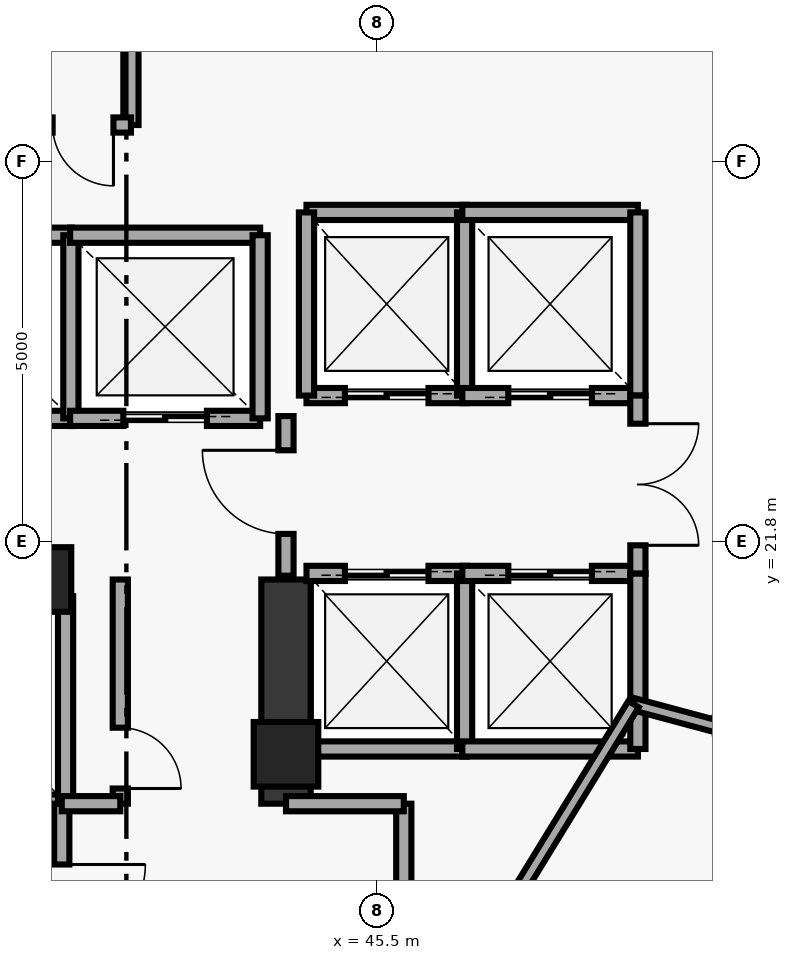
"""IFC4 building model, lengths in metres.
Left out: names, types, materials, properties, quantities, classifications, styles, units other than length and angle.
Written with IfcOpenShell. Run it as: python <this file> out.ifc"""

import sys

from ifc_helpers import new_model, si_unit, direction, frame, frame_2d, origin, origin_2d, place, context, subcontext, project, spatial, rectangle, extrude, element, fill, save


model = new_model("IFC4")
c1 = context("Model", 3, precision=1e-05, world=origin(), true_north=direction((0.0, 1.0)))
c2 = subcontext(c1, "Body", "Model", "MODEL_VIEW")
j1 = project(units=[si_unit("LENGTHUNIT", "METRE"), si_unit("PLANEANGLEUNIT", "RADIAN")], contexts=[c1])
p1 = place(None, origin())
s1 = spatial("IfcSite", under=j1, at=p1, CompositionType="ELEMENT")
p2 = place(p1, origin())
s2 = spatial("IfcBuilding", under=s1, at=p2, CompositionType="ELEMENT")
p3 = place(p2, frame((0.0, 0.0, 203.15)))
s3 = spatial("IfcBuildingStorey", under=s2, at=p3, CompositionType="ELEMENT", Elevation=203.15)
for number, where, z_axis, x_axis in (
    (1, (41.05, 21.3, 0.0), (0.0, 0.0, 1.0), (1.0, 0.0, 0.0)),
    (2, (44.3, 19.0, 0.0), (0.0, 0.0, 1.0), (1.0, 0.0, 0.0)),
):
    element("IfcColumn", number, at=place(p3, frame(where, z_axis=z_axis, x_axis=x_axis)), inside=s3, PredefinedType="PILASTER", context=c2, shape_type="SweptSolid", body=[
        extrude(rectangle(XDim=0.85, YDim=0.85, at=origin_2d()), origin(), (0.0, 0.0, 1.0), 4.76),
    ])
p4 = place(p3, frame((44.3, 18.35, 0.0), z_axis=(0.0, 0.0, 1.0), x_axis=(0.0, 1.0, 0.0)))
e3 = element("IfcWall", 3, at=p4, inside=s3, PredefinedType="SHEAR", context=c2, shape_type="SweptSolid", body=[
    extrude(rectangle(XDim=2.95, YDim=0.65, at=frame_2d((1.475, 0.0))), origin(), (0.0, 0.0, 1.0), 4.76),
])
p5 = place(p3, frame((33.7, 21.3, 0.0), z_axis=(0.0, 0.0, 1.0), x_axis=(1.0, 0.0, 0.0)))
e4 = element("IfcWall", 4, at=p5, inside=s3, PredefinedType="SHEAR", context=c2, shape_type="SweptSolid", body=[
    extrude(rectangle(XDim=7.55, YDim=0.65, at=frame_2d((3.775, 0.0))), origin(), (0.0, 0.0, 1.0), 4.76),
])
p6 = place(p3, frame((42.26, 27.28, 0.0), z_axis=(0.0, 0.0, 1.0), x_axis=(0.0, 1.0, 0.0)))
e5 = element("IfcWall", 5, at=p6, inside=s3, PredefinedType="SOLIDWALL", context=c2, shape_type="SweptSolid", body=[
    extrude(rectangle(XDim=1.77, YDim=0.2, at=frame_2d((0.885, 0.0))), origin(), (0.0, 0.0, 1.0), 4.76),
])
p7 = place(p3, frame((41.0, 27.28, 0.0), z_axis=(0.0, 0.0, 1.0), x_axis=(1.0, 0.0, 0.0)))
e6 = element("IfcWall", 6, at=p7, inside=s3, PredefinedType="SOLIDWALL", context=c2, shape_type="SweptSolid", body=[
    extrude(rectangle(XDim=1.26, YDim=0.2, at=frame_2d((0.63, 0.0))), origin(), (0.0, 0.0, 1.0), 4.76),
])
p8 = place(p7, frame((0.23, 0.0, 0.0)))
e7 = element("IfcOpeningElement", 7, at=p8, cuts=e6, PredefinedType="OPENING", context=c2, shape_type="SweptSolid", body=[
    extrude(rectangle(XDim=0.8, YDim=2.05, at=frame_2d((0.4, 1.025))), frame((0.0, 0.11, 0.0), z_axis=(0.0, -1.0, 0.0), x_axis=(1.0, 0.0, 0.0)), (0.0, 0.0, 1.0), 0.22),
])
p9 = place(p3, frame((44.57, 23.72, 0.0), z_axis=(0.0, 0.0, 1.0), x_axis=(1.0, 0.0, 0.0)))
e8 = element("IfcWall", 8, at=p9, inside=s3, PredefinedType="SOLIDWALL", context=c2, shape_type="SweptSolid", body=[
    extrude(rectangle(XDim=2.11, YDim=0.2, at=frame_2d((1.055, 0.0))), origin(), (0.0, 0.0, 1.0), 4.76),
])
p10 = place(p9, frame((0.505, 0.0, 0.0)))
e9 = element("IfcOpeningElement", 9, at=p10, cuts=e8, PredefinedType="OPENING", context=c2, shape_type="SweptSolid", body=[
    extrude(rectangle(XDim=1.1, YDim=2.15, at=frame_2d((0.55, 1.075))), frame((0.0, 0.11, 0.0), z_axis=(0.0, -1.0, 0.0), x_axis=(1.0, 0.0, 0.0)), (0.0, 0.0, 1.0), 0.22),
])
p11 = place(p3, frame((44.57, 26.13, 0.0), z_axis=(0.0, 0.0, 1.0), x_axis=(1.0, 0.0, 0.0)))
e10 = element("IfcWall", 10, at=p11, inside=s3, PredefinedType="SOLIDWALL", context=c2, shape_type="SweptSolid", body=[
    extrude(rectangle(XDim=2.11, YDim=0.2, at=frame_2d((1.055, 0.0))), origin(), (0.0, 0.0, 1.0), 4.76),
])
for number, where, z_axis, x_axis in (
    (11, (44.57, 23.72, 0.0), (0.0, 0.0, 1.0), (0.0, 1.0, 0.0)),
    (12, (46.65, 23.72, 0.0), (0.0, 0.0, 1.0), (0.0, 1.0, 0.0)),
):
    element("IfcWall", number, at=place(p3, frame(where, z_axis=z_axis, x_axis=x_axis)), inside=s3, PredefinedType="SOLIDWALL", context=c2, shape_type="SweptSolid", body=[
        extrude(rectangle(XDim=2.41, YDim=0.2, at=frame_2d((1.205, 0.0))), origin(), (0.0, 0.0, 1.0), 4.76),
    ])
p12 = place(p3, frame((46.62, 23.72, 0.0), z_axis=(0.0, 0.0, 1.0), x_axis=(1.0, 0.0, 0.0)))
e13 = element("IfcWall", 13, at=p12, inside=s3, PredefinedType="SOLIDWALL", context=c2, shape_type="SweptSolid", body=[
    extrude(rectangle(XDim=2.31, YDim=0.2, at=frame_2d((1.155, 0.0))), origin(), (0.0, 0.0, 1.0), 4.76),
])
p13 = place(p12, frame((0.605, 0.0, 0.0)))
e14 = element("IfcOpeningElement", 14, at=p13, cuts=e13, PredefinedType="OPENING", context=c2, shape_type="SweptSolid", body=[
    extrude(rectangle(XDim=1.1, YDim=2.15, at=frame_2d((0.55, 1.075))), frame((0.0, 0.11, 0.0), z_axis=(0.0, -1.0, 0.0), x_axis=(1.0, 0.0, 0.0)), (0.0, 0.0, 1.0), 0.22),
])
p14 = place(p3, frame((46.62, 26.13, 0.0), z_axis=(0.0, 0.0, 1.0), x_axis=(1.0, 0.0, 0.0)))
e15 = element("IfcWall", 15, at=p14, inside=s3, PredefinedType="SOLIDWALL", context=c2, shape_type="SweptSolid", body=[
    extrude(rectangle(XDim=2.31, YDim=0.2, at=frame_2d((1.155, 0.0))), origin(), (0.0, 0.0, 1.0), 4.76),
])
p15 = place(p3, frame((48.93, 23.72, 0.0), z_axis=(0.0, 0.0, 1.0), x_axis=(0.0, 1.0, 0.0)))
e16 = element("IfcWall", 16, at=p15, inside=s3, PredefinedType="SOLIDWALL", context=c2, shape_type="SweptSolid", body=[
    extrude(rectangle(XDim=2.41, YDim=0.2, at=frame_2d((1.205, 0.0))), origin(), (0.0, 0.0, 1.0), 4.76),
])
p16 = place(p3, frame((44.57, 19.07, 0.0), z_axis=(0.0, 0.0, 1.0), x_axis=(1.0, 0.0, 0.0)))
e17 = element("IfcWall", 17, at=p16, inside=s3, PredefinedType="SOLIDWALL", context=c2, shape_type="SweptSolid", body=[
    extrude(rectangle(XDim=2.11, YDim=0.2, at=frame_2d((1.055, 0.0))), origin(), (0.0, 0.0, 1.0), 4.76),
])
p17 = place(p3, frame((44.57, 21.38, 0.0), z_axis=(0.0, 0.0, 1.0), x_axis=(1.0, 0.0, 0.0)))
e18 = element("IfcWall", 18, at=p17, inside=s3, PredefinedType="SOLIDWALL", context=c2, shape_type="SweptSolid", body=[
    extrude(rectangle(XDim=2.11, YDim=0.2, at=frame_2d((1.055, 0.0))), origin(), (0.0, 0.0, 1.0), 4.76),
])
p18 = place(p17, frame((0.505, 0.0, 0.0)))
e19 = element("IfcOpeningElement", 19, at=p18, cuts=e18, PredefinedType="OPENING", context=c2, shape_type="SweptSolid", body=[
    extrude(rectangle(XDim=1.1, YDim=2.15, at=frame_2d((0.55, 1.075))), frame((0.0, 0.11, 0.0), z_axis=(0.0, -1.0, 0.0), x_axis=(1.0, 0.0, 0.0)), (0.0, 0.0, 1.0), 0.22),
])
for number, where, z_axis, x_axis in (
    (20, (46.65, 19.07, 0.0), (0.0, 0.0, 1.0), (0.0, 1.0, 0.0)),
    (21, (46.62, 19.07, 0.0), (0.0, 0.0, 1.0), (1.0, 0.0, 0.0)),
):
    element("IfcWall", number, at=place(p3, frame(where, z_axis=z_axis, x_axis=x_axis)), inside=s3, PredefinedType="SOLIDWALL", context=c2, shape_type="SweptSolid", body=[
        extrude(rectangle(XDim=2.31, YDim=0.2, at=frame_2d((1.155, 0.0))), origin(), (0.0, 0.0, 1.0), 4.76),
    ])
p19 = place(p3, frame((46.62, 21.38, 0.0), z_axis=(0.0, 0.0, 1.0), x_axis=(1.0, 0.0, 0.0)))
e22 = element("IfcWall", 22, at=p19, inside=s3, PredefinedType="SOLIDWALL", context=c2, shape_type="SweptSolid", body=[
    extrude(rectangle(XDim=2.31, YDim=0.2, at=frame_2d((1.155, 0.0))), origin(), (0.0, 0.0, 1.0), 4.76),
])
p20 = place(p19, frame((0.605, 0.0, 0.0)))
e23 = element("IfcOpeningElement", 23, at=p20, cuts=e22, PredefinedType="OPENING", context=c2, shape_type="SweptSolid", body=[
    extrude(rectangle(XDim=1.1, YDim=2.15, at=frame_2d((0.55, 1.075))), frame((0.0, 0.11, 0.0), z_axis=(0.0, -1.0, 0.0), x_axis=(1.0, 0.0, 0.0)), (0.0, 0.0, 1.0), 0.22),
])
p21 = place(p3, frame((48.93, 19.07, 0.0), z_axis=(0.0, 0.0, 1.0), x_axis=(0.0, 1.0, 0.0)))
e24 = element("IfcWall", 24, at=p21, inside=s3, PredefinedType="SOLIDWALL", context=c2, shape_type="SweptSolid", body=[
    extrude(rectangle(XDim=2.31, YDim=0.2, at=frame_2d((1.155, 0.0))), origin(), (0.0, 0.0, 1.0), 4.76),
])
p22 = place(p3, frame((38.98, 23.42, 0.0), z_axis=(0.0, 0.0, 1.0), x_axis=(1.0, 0.0, 0.0)))
e25 = element("IfcWall", 25, at=p22, inside=s3, PredefinedType="SOLIDWALL", context=c2, shape_type="SweptSolid", body=[
    extrude(rectangle(XDim=2.5, YDim=0.2, at=frame_2d((1.25, 0.0))), origin(), (0.0, 0.0, 1.0), 4.76),
])
p23 = place(p22, frame((0.7, 0.0, 0.0)))
e26 = element("IfcOpeningElement", 26, at=p23, cuts=e25, PredefinedType="OPENING", context=c2, shape_type="SweptSolid", body=[
    extrude(rectangle(XDim=1.1, YDim=2.15, at=frame_2d((0.55, 1.075))), frame((0.0, 0.11, 0.0), z_axis=(0.0, -1.0, 0.0), x_axis=(1.0, 0.0, 0.0)), (0.0, 0.0, 1.0), 0.22),
])
p24 = place(p3, frame((38.98, 25.83, 0.0), z_axis=(0.0, 0.0, 1.0), x_axis=(1.0, 0.0, 0.0)))
e27 = element("IfcWall", 27, at=p24, inside=s3, PredefinedType="SOLIDWALL", context=c2, shape_type="SweptSolid", body=[
    extrude(rectangle(XDim=2.5, YDim=0.2, at=frame_2d((1.25, 0.0))), origin(), (0.0, 0.0, 1.0), 4.76),
])
p25 = place(p3, frame((41.47, 23.42, 0.0), z_axis=(0.0, 0.0, 1.0), x_axis=(0.0, 1.0, 0.0)))
e28 = element("IfcWall", 28, at=p25, inside=s3, PredefinedType="SOLIDWALL", context=c2, shape_type="SweptSolid", body=[
    extrude(rectangle(XDim=2.41, YDim=0.2, at=frame_2d((1.205, 0.0))), origin(), (0.0, 0.0, 1.0), 4.76),
])
p26 = place(p3, frame((41.46, 23.42, 0.0), z_axis=(0.0, 0.0, 1.0), x_axis=(1.0, 0.0, 0.0)))
e29 = element("IfcWall", 29, at=p26, inside=s3, PredefinedType="SOLIDWALL", context=c2, shape_type="SweptSolid", body=[
    extrude(rectangle(XDim=2.5, YDim=0.2, at=frame_2d((1.25, 0.0))), origin(), (0.0, 0.0, 1.0), 4.76),
])
p27 = place(p26, frame((0.7, 0.0, 0.0)))
e30 = element("IfcOpeningElement", 30, at=p27, cuts=e29, PredefinedType="OPENING", context=c2, shape_type="SweptSolid", body=[
    extrude(rectangle(XDim=1.1, YDim=2.15, at=frame_2d((0.55, 1.075))), frame((0.0, 0.11, 0.0), z_axis=(0.0, -1.0, 0.0), x_axis=(1.0, 0.0, 0.0)), (0.0, 0.0, 1.0), 0.22),
])
p28 = place(p3, frame((41.46, 25.83, 0.0), z_axis=(0.0, 0.0, 1.0), x_axis=(1.0, 0.0, 0.0)))
e31 = element("IfcWall", 31, at=p28, inside=s3, PredefinedType="SOLIDWALL", context=c2, shape_type="SweptSolid", body=[
    extrude(rectangle(XDim=2.5, YDim=0.2, at=frame_2d((1.25, 0.0))), origin(), (0.0, 0.0, 1.0), 4.76),
])
p29 = place(p3, frame((43.96, 23.42, 0.0), z_axis=(0.0, 0.0, 1.0), x_axis=(0.0, 1.0, 0.0)))
e32 = element("IfcWall", 32, at=p29, inside=s3, PredefinedType="SOLIDWALL", context=c2, shape_type="SweptSolid", body=[
    extrude(rectangle(XDim=2.41, YDim=0.2, at=frame_2d((1.205, 0.0))), origin(), (0.0, 0.0, 1.0), 4.76),
])
p30 = place(p3, frame((38.57, 18.37, 0.0), z_axis=(0.0, 0.0, 1.0), x_axis=(1.0, 0.0, 0.0)))
e33 = element("IfcWall", 33, at=p30, inside=s3, PredefinedType="SOLIDWALL", context=c2, shape_type="SweptSolid", body=[
    extrude(rectangle(XDim=2.83, YDim=0.2, at=frame_2d((1.415, 0.0))), origin(), (0.0, 0.0, 1.0), 4.76),
])
p31 = place(p30, frame((1.18, 0.0, 0.0)))
e34 = element("IfcOpeningElement", 34, at=p31, cuts=e33, PredefinedType="OPENING", context=c2, shape_type="SweptSolid", body=[
    extrude(rectangle(XDim=1.35, YDim=2.18, at=frame_2d((0.675, 1.09))), frame((0.0, 0.11, 0.0), z_axis=(0.0, -1.0, 0.0), x_axis=(1.0, 0.0, 0.0)), (0.0, 0.0, 1.0), 0.22),
])
p32 = place(p3, frame((41.4, 18.37, 0.0), z_axis=(0.0, 0.0, 1.0), x_axis=(0.0, 1.0, 0.0)))
e35 = element("IfcWall", 35, at=p32, inside=s3, PredefinedType="SOLIDWALL", context=c2, shape_type="SweptSolid", body=[
    extrude(rectangle(XDim=2.71, YDim=0.2, at=frame_2d((1.355, 0.0))), origin(), (0.0, 0.0, 1.0), 4.76),
])
p33 = place(p3, frame((48.93, 21.38, 0.0), z_axis=(0.0, 0.0, 1.0), x_axis=(0.0, 1.0, 0.0)))
e36 = element("IfcWall", 36, at=p33, inside=s3, PredefinedType="SOLIDWALL", context=c2, shape_type="SweptSolid", body=[
    extrude(rectangle(XDim=2.34, YDim=0.2, at=frame_2d((1.17, 0.0))), origin(), (0.0, 0.0, 1.0), 4.76),
])
p34 = place(p33, frame((0.37, 0.0, 0.0)))
e37 = element("IfcOpeningElement", 37, at=p34, cuts=e36, PredefinedType="OPENING", context=c2, shape_type="SweptSolid", body=[
    extrude(rectangle(XDim=1.6, YDim=2.2, at=frame_2d((0.8, 1.1))), frame((0.0, 0.11, 0.0), z_axis=(0.0, -1.0, 0.0), x_axis=(1.0, 0.0, 0.0)), (0.0, 0.0, 1.0), 0.22),
])
p35 = place(p3, frame((44.3, 21.35, 0.0), z_axis=(0.0, 0.0, 1.0), x_axis=(0.0, 1.0, 0.0)))
e38 = element("IfcWall", 38, at=p35, inside=s3, PredefinedType="SOLIDWALL", context=c2, shape_type="SweptSolid", body=[
    extrude(rectangle(XDim=2.1, YDim=0.2, at=frame_2d((1.05, 0.0))), origin(), (0.0, 0.0, 1.0), 4.145),
])
p36 = place(p35, frame((0.55, 0.0, 0.0)))
e39 = element("IfcOpeningElement", 39, at=p36, cuts=e38, PredefinedType="OPENING", context=c2, shape_type="SweptSolid", body=[
    extrude(rectangle(XDim=1.1, YDim=2.15, at=frame_2d((0.55, 1.075))), frame((0.0, 0.11, 0.0), z_axis=(0.0, -1.0, 0.0), x_axis=(1.0, 0.0, 0.0)), (0.0, 0.0, 1.0), 0.22),
])
p37 = place(p3, frame((41.35, 15.55, 0.0), z_axis=(0.0, 0.0, 1.0), x_axis=(0.0, 1.0, 0.0)))
e40 = element("IfcWall", 40, at=p37, inside=s3, PredefinedType="SOLIDWALL", context=c2, shape_type="SweptSolid", body=[
    extrude(rectangle(XDim=2.8, YDim=0.2, at=frame_2d((1.4, 0.0))), origin(), (0.0, 0.0, 1.0), 4.76),
])
p38 = place(p37, frame((0.9, 0.0, 0.0)))
e41 = element("IfcOpeningElement", 41, at=p38, cuts=e40, PredefinedType="OPENING", context=c2, shape_type="SweptSolid", body=[
    extrude(rectangle(XDim=1.1, YDim=2.15, at=frame_2d((0.55, 1.075))), frame((0.0, 0.11, 0.0), z_axis=(0.0, -1.0, 0.0), x_axis=(1.0, 0.0, 0.0)), (0.0, 0.0, 1.0), 0.22),
])
p39 = place(p3, frame((45.85, 16.05, 0.0), z_axis=(0.0, 0.0, 1.0), x_axis=(0.0, 1.0, 0.0)))
e42 = element("IfcWall", 42, at=p39, inside=s3, PredefinedType="SOLIDWALL", context=c2, shape_type="SweptSolid", body=[
    extrude(rectangle(XDim=2.3, YDim=0.2, at=frame_2d((1.15, 0.0))), origin(), (0.0, 0.0, 1.0), 4.76),
])
p40 = place(p3, frame((44.3, 18.35, 0.0), z_axis=(0.0, 0.0, 1.0), x_axis=(1.0, 0.0, 0.0)))
e43 = element("IfcWall", 43, at=p40, inside=s3, PredefinedType="SOLIDWALL", context=c2, shape_type="SweptSolid", body=[
    extrude(rectangle(XDim=1.55, YDim=0.2, at=frame_2d((0.775, 0.0))), origin(), (0.0, 0.0, 1.0), 4.76),
])
p41 = place(p3, frame((42.12, 18.35, 0.0), z_axis=(0.0, 0.0, 1.0), x_axis=(0.0, 1.0, 0.0)))
e44 = element("IfcWall", 44, at=p41, inside=s3, PredefinedType="SOLIDWALL", context=c2, shape_type="SweptSolid", body=[
    extrude(rectangle(XDim=2.95, YDim=0.2, at=frame_2d((1.475, 0.0))), origin(), (0.0, 0.0, 1.0), 4.76),
])
p42 = place(p41, frame((0.2, 0.0, 0.0)))
e45 = element("IfcOpeningElement", 45, at=p42, cuts=e44, PredefinedType="OPENING", context=c2, shape_type="SweptSolid", body=[
    extrude(rectangle(XDim=0.8, YDim=2.05, at=frame_2d((0.4, 1.025))), frame((0.0, 0.11, 0.0), z_axis=(0.0, -1.0, 0.0), x_axis=(1.0, 0.0, 0.0)), (0.0, 0.0, 1.0), 0.22),
])
p43 = place(p3, frame((41.35, 18.35, 0.0), z_axis=(0.0, 0.0, 1.0), x_axis=(1.0, 0.0, 0.0)))
e46 = element("IfcWall", 46, at=p43, inside=s3, PredefinedType="SOLIDWALL", context=c2, shape_type="SweptSolid", body=[
    extrude(rectangle(XDim=0.77, YDim=0.2, at=frame_2d((0.385, 0.0))), origin(), (0.0, 0.0, 1.0), 4.76),
])
p44 = place(p3, frame((51.238, 22.951, 0.0), z_axis=(0.0, 0.0, 1.0), x_axis=(-0.332705930675, -0.943030627124, 0.0)))
e47 = element("IfcWall", 47, at=p44, inside=s3, PredefinedType="PARTITIONING", context=c2, shape_type="SweptSolid", body=[
    extrude(rectangle(XDim=3.802, YDim=0.16, at=frame_2d((1.901, 0.0))), origin(), (0.0, 0.0, 1.0), 4.76),
])
p45 = place(p44, frame((1.101, 0.0, 0.0)))
e48 = element("IfcOpeningElement", 48, at=p45, cuts=e47, PredefinedType="OPENING", context=c2, shape_type="SweptSolid", body=[
    extrude(rectangle(XDim=1.6, YDim=2.2, at=frame_2d((0.8, 1.1))), frame((0.0, 0.09, 0.0), z_axis=(0.0, -1.0, 0.0), x_axis=(1.0, 0.0, 0.0)), (0.0, 0.0, 1.0), 0.18),
])
p46 = place(p3, frame((48.873, 19.66, 0.0), z_axis=(0.0, 0.0, 1.0), x_axis=(0.965878165217, -0.258996853181, 0.0)))
e49 = element("IfcWall", 49, at=p46, inside=s3, PredefinedType="PARTITIONING", context=c2, shape_type="SweptSolid", body=[
    extrude(rectangle(XDim=1.139, YDim=0.16, at=frame_2d((0.569, 0.0))), origin(), (0.0, 0.0, 1.0), 4.76),
])
p47 = place(p3, frame((47.061, 16.703, 0.0), z_axis=(0.0, 0.0, 1.0), x_axis=(0.522486120877, 0.852647789823, 0.0)))
e50 = element("IfcWall", 50, at=p47, inside=s3, PredefinedType="PARTITIONING", context=c2, shape_type="SweptSolid", body=[
    extrude(rectangle(XDim=3.468, YDim=0.16, at=frame_2d((1.734, 0.0))), origin(), (0.0, 0.0, 1.0), 4.76),
])
p48 = place(p8, origin())
e51 = element("IfcDoor", 51, at=p48, inside=s3, OperationType="SINGLE_SWING_RIGHT", PredefinedType="DOOR", context=c2, shape_type="SweptSolid", body=[
    extrude(rectangle(XDim=0.8, YDim=2.05, at=frame_2d((0.4, 1.025))), frame((0.0, 0.025, 0.0), z_axis=(0.0, -1.0, 0.0), x_axis=(1.0, 0.0, 0.0)), (0.0, 0.0, 1.0), 0.05),
])
fill(e7, e51)
p49 = place(p10, origin())
e52 = element("IfcDoor", 52, at=p49, inside=s3, OperationType="DOUBLE_DOOR_SLIDING", PredefinedType="DOOR", context=c2, shape_type="SweptSolid", body=[
    extrude(rectangle(XDim=1.1, YDim=2.15, at=frame_2d((0.55, 1.075))), frame((0.0, 0.025, 0.0), z_axis=(0.0, -1.0, 0.0), x_axis=(1.0, 0.0, 0.0)), (0.0, 0.0, 1.0), 0.05),
])
fill(e9, e52)
p50 = place(p13, origin())
e53 = element("IfcDoor", 53, at=p50, inside=s3, OperationType="DOUBLE_DOOR_SLIDING", PredefinedType="DOOR", context=c2, shape_type="SweptSolid", body=[
    extrude(rectangle(XDim=1.1, YDim=2.15, at=frame_2d((0.55, 1.075))), frame((0.0, 0.025, 0.0), z_axis=(0.0, -1.0, 0.0), x_axis=(1.0, 0.0, 0.0)), (0.0, 0.0, 1.0), 0.05),
])
fill(e14, e53)
p51 = place(p18, origin())
e54 = element("IfcDoor", 54, at=p51, inside=s3, OperationType="DOUBLE_DOOR_SLIDING", PredefinedType="DOOR", context=c2, shape_type="SweptSolid", body=[
    extrude(rectangle(XDim=1.1, YDim=2.15, at=frame_2d((0.55, 1.075))), frame((0.0, 0.025, 0.0), z_axis=(0.0, -1.0, 0.0), x_axis=(1.0, 0.0, 0.0)), (0.0, 0.0, 1.0), 0.05),
])
fill(e19, e54)
p52 = place(p20, origin())
e55 = element("IfcDoor", 55, at=p52, inside=s3, OperationType="DOUBLE_DOOR_SLIDING", PredefinedType="DOOR", context=c2, shape_type="SweptSolid", body=[
    extrude(rectangle(XDim=1.1, YDim=2.15, at=frame_2d((0.55, 1.075))), frame((0.0, 0.025, 0.0), z_axis=(0.0, -1.0, 0.0), x_axis=(1.0, 0.0, 0.0)), (0.0, 0.0, 1.0), 0.05),
])
fill(e23, e55)
p53 = place(p27, origin())
e56 = element("IfcDoor", 56, at=p53, inside=s3, OperationType="DOUBLE_DOOR_SLIDING", PredefinedType="DOOR", context=c2, shape_type="SweptSolid", body=[
    extrude(rectangle(XDim=1.1, YDim=2.15, at=frame_2d((0.55, 1.075))), frame((0.0, 0.025, 0.0), z_axis=(0.0, -1.0, 0.0), x_axis=(1.0, 0.0, 0.0)), (0.0, 0.0, 1.0), 0.05),
])
fill(e30, e56)
p54 = place(p34, origin())
e57 = element("IfcDoor", 57, at=p54, inside=s3, OperationType="DOUBLE_DOOR_SINGLE_SWING", PredefinedType="DOOR", context=c2, shape_type="SweptSolid", body=[
    extrude(rectangle(XDim=1.6, YDim=2.2, at=frame_2d((0.8, 1.1))), frame((0.0, 0.025, 0.0), z_axis=(0.0, -1.0, 0.0), x_axis=(1.0, 0.0, 0.0)), (0.0, 0.0, 1.0), 0.05),
])
fill(e37, e57)
p55 = place(p36, origin())
e58 = element("IfcDoor", 58, at=p55, inside=s3, OperationType="SINGLE_SWING_RIGHT", PredefinedType="DOOR", context=c2, shape_type="SweptSolid", body=[
    extrude(rectangle(XDim=1.1, YDim=2.15, at=frame_2d((0.55, 1.075))), frame((0.0, 0.025, 0.0), z_axis=(0.0, -1.0, 0.0), x_axis=(1.0, 0.0, 0.0)), (0.0, 0.0, 1.0), 0.05),
])
fill(e39, e58)
p56 = place(p38, origin())
e59 = element("IfcDoor", 59, at=p56, inside=s3, OperationType="SINGLE_SWING_RIGHT", PredefinedType="DOOR", context=c2, shape_type="SweptSolid", body=[
    extrude(rectangle(XDim=1.1, YDim=2.15, at=frame_2d((0.55, 1.075))), frame((0.0, 0.025, 0.0), z_axis=(0.0, -1.0, 0.0), x_axis=(1.0, 0.0, 0.0)), (0.0, 0.0, 1.0), 0.05),
])
fill(e41, e59)
p57 = place(p42, origin())
e60 = element("IfcDoor", 60, at=p57, inside=s3, OperationType="SINGLE_SWING_LEFT", PredefinedType="DOOR", context=c2, shape_type="SweptSolid", body=[
    extrude(rectangle(XDim=0.8, YDim=2.05, at=frame_2d((0.4, 1.025))), frame((0.0, 0.025, 0.0), z_axis=(0.0, -1.0, 0.0), x_axis=(1.0, 0.0, 0.0)), (0.0, 0.0, 1.0), 0.05),
])
fill(e45, e60)
save(model, sys.argv[1])
